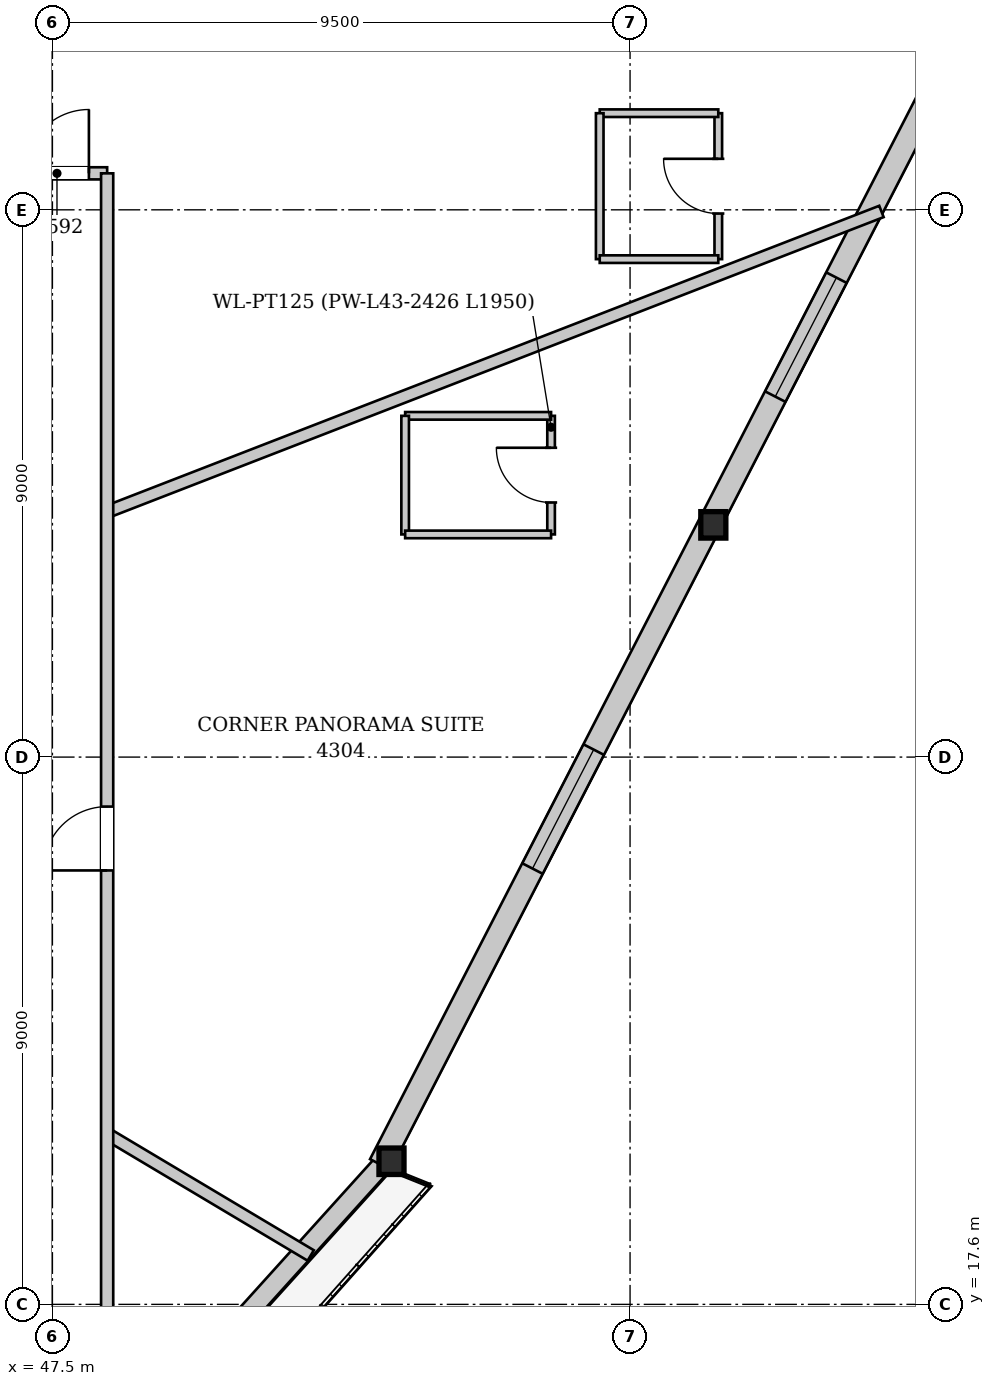
"""IFC4 building model, lengths in metres.
Left out: names, types, materials, properties, quantities, classifications, styles, units other than length and angle.
Written with IfcOpenShell. Run it as: python <this file> out.ifc"""

import sys

from ifc_helpers import new_model, si_unit, direction, frame, frame_2d, origin, origin_2d, place, context, subcontext, project, spatial, rectangle, i_section, extrude, source, transform, mapped, element, fill, save


model = new_model("IFC4")
c1 = context("Model", 3, precision=1e-05, world=origin(), true_north=direction((0.0, 1.0)))
c2 = subcontext(c1, "Body", "Model", "MODEL_VIEW")
j1 = project(units=[si_unit("LENGTHUNIT", "METRE"), si_unit("PLANEANGLEUNIT", "RADIAN")], contexts=[c1])
p1 = place(None, origin())
s1 = spatial("IfcSite", under=j1, at=p1, CompositionType="ELEMENT")
p2 = place(p1, origin())
s2 = spatial("IfcBuilding", under=s1, at=p2, CompositionType="ELEMENT")
p3 = place(p2, frame((0.0, 0.0, 164.35)))
s3 = spatial("IfcBuildingStorey", under=s2, at=p3, CompositionType="ELEMENT", Elevation=164.35)
m1 = source(origin(), c2, "Body", "SweptSolid", [
    extrude(i_section(OverallWidth=0.412, OverallDepth=0.435, WebThickness=0.031, FlangeThickness=0.05, at=origin_2d()), origin(), (0.0, 0.0, 1.0), 3.396),
])
p4 = place(p3, frame((53.062, 19.814, 0.0), z_axis=(0.008697331345, 0.081941799451, 0.99659916613), x_axis=(-0.994414264622, 0.105547478964, 0.0)))
e1 = element("IfcColumn", 1, at=p4, inside=s3, PredefinedType="COLUMN", context=c2, shape_type="MappedRepresentation", body=[
    mapped(m1, transform((0.0, 0.0, 0.0), x_axis=(1.0, 0.0, 0.0), y_axis=(0.0, 1.0, 0.0), z_axis=(0.0, 0.0, 1.0), scale=1.0)),
])
m2 = source(origin(), c2, "Body", "SweptSolid", [
    extrude(i_section(OverallWidth=0.412, OverallDepth=0.435, WebThickness=0.031, FlangeThickness=0.05, at=origin_2d()), origin(), (0.0, 0.0, 1.0), 3.404),
])
p5 = place(p3, frame((58.43, 30.25, 0.0), z_axis=(-0.035575108615, 0.09897913284, 0.994453389008), x_axis=(-0.941061150678, -0.338236471548, 0.0)))
e2 = element("IfcColumn", 2, at=p5, inside=s3, PredefinedType="COLUMN", context=c2, shape_type="MappedRepresentation", body=[
    mapped(m2, transform((0.0, 0.0, 0.0), x_axis=(1.0, 0.0, 0.0), y_axis=(0.0, 1.0, 0.0), z_axis=(0.0, 0.0, 1.0), scale=1.0)),
])
p6 = place(p3, frame((52.943, 19.922, 0.0), z_axis=(0.0, 0.0, 1.0), x_axis=(-0.670163184214, -0.742213787614, 0.0)))
e3 = element("IfcWall", 3, at=p6, inside=s3, PredefinedType="SOLIDWALL", context=c2, shape_type="SweptSolid", body=[
    extrude(rectangle(XDim=23.472, YDim=0.32, at=frame_2d((11.736, 0.0))), origin(), (0.0, 0.0, 1.0), 2.722),
])
p7 = place(p6, frame((6.761, 0.0, 0.0)))
e4 = element("IfcOpeningElement", 4, at=p7, cuts=e3, PredefinedType="OPENING", context=c2, shape_type="SweptSolid", body=[
    extrude(rectangle(XDim=1.5, YDim=2.3, at=frame_2d((0.75, 1.15))), frame((0.0, 0.17, 0.0), z_axis=(0.0, -1.0, 0.0), x_axis=(1.0, 0.0, 0.0)), (0.0, 0.0, 1.0), 0.34),
])
p8 = place(p6, frame((17.669, 0.0, 0.252)))
e5 = element("IfcOpeningElement", 5, at=p8, cuts=e3, PredefinedType="OPENING", context=c2, shape_type="SweptSolid", body=[
    extrude(rectangle(XDim=2.6, YDim=2.35, at=frame_2d((1.3, 1.175))), frame((0.0, 0.17, 0.0), z_axis=(0.0, -1.0, 0.0), x_axis=(1.0, 0.0, 0.0)), (0.0, 0.0, 1.0), 0.34),
])
p9 = place(p3, frame((63.629, 40.773, 0.0), z_axis=(0.0, 0.0, 1.0), x_axis=(-0.457435909199, -0.889242592871, 0.0)))
e6 = element("IfcWall", 6, at=p9, inside=s3, PredefinedType="SOLIDWALL", context=c2, shape_type="SweptSolid", body=[
    extrude(rectangle(XDim=23.472, YDim=0.38, at=frame_2d((11.736, 0.0))), origin(), (0.0, 0.0, 1.0), 2.722),
])
p10 = place(p9, frame((7.072, 0.0, 0.352)))
e7 = element("IfcOpeningElement", 7, at=p10, cuts=e6, PredefinedType="OPENING", context=c2, shape_type="SweptSolid", body=[
    extrude(rectangle(XDim=2.2, YDim=2.25, at=frame_2d((1.1, 1.125))), frame((0.0, 0.2, 0.0), z_axis=(0.0, -1.0, 0.0), x_axis=(1.0, 0.0, 0.0)), (0.0, 0.0, 1.0), 0.4),
])
p11 = place(p9, frame((15.8, 0.0, 0.352)))
e8 = element("IfcOpeningElement", 8, at=p11, cuts=e6, PredefinedType="OPENING", context=c2, shape_type="SweptSolid", body=[
    extrude(rectangle(XDim=2.2, YDim=2.25, at=frame_2d((1.1, 1.125))), frame((0.0, 0.2, 0.0), z_axis=(0.0, -1.0, 0.0), x_axis=(1.0, 0.0, 0.0)), (0.0, 0.0, 1.0), 0.4),
])
p12 = place(p3, frame((48.4, 20.4, 0.0), z_axis=(0.0, 0.0, 1.0), x_axis=(0.858964986341, -0.512034327209, 0.0)))
e9 = element("IfcWall", 9, at=p12, inside=s3, PredefinedType="PARTITIONING", context=c2, shape_type="SweptSolid", body=[
    extrude(rectangle(XDim=3.898, YDim=0.2, at=frame_2d((1.949, 0.0))), origin(), (0.0, 0.0, 1.0), 3.33),
])
p13 = place(p3, frame((48.4, 30.634, 0.0), z_axis=(0.0, 0.0, 1.0), x_axis=(0.932320972831, 0.361631862008, 0.0)))
e10 = element("IfcWall", 10, at=p13, inside=s3, PredefinedType="PARTITIONING", context=c2, shape_type="SweptSolid", body=[
    extrude(rectangle(XDim=13.659, YDim=0.2, at=frame_2d((6.829, 0.0))), origin(), (0.0, 0.0, 1.0), 3.33),
])
p14 = place(p3, frame((55.701, 30.262, 0.0), z_axis=(0.0, 0.0, 1.0), x_axis=(0.0, 1.0, 0.0)))
e11 = element("IfcWall", 11, at=p14, inside=s3, PredefinedType="PARTITIONING", context=c2, shape_type="SweptSolid", body=[
    extrude(rectangle(XDim=1.95, YDim=0.125, at=frame_2d((0.975, 0.0))), origin(), (0.0, 0.0, 1.0), 3.33),
])
p15 = place(p14, frame((0.525, 0.0, 0.0)))
e12 = element("IfcOpeningElement", 12, at=p15, cuts=e11, PredefinedType="OPENING", context=c2, shape_type="SweptSolid", body=[
    extrude(rectangle(XDim=0.9, YDim=2.1, at=frame_2d((0.45, 1.05))), frame((0.0, 0.073, 0.0), z_axis=(0.0, -1.0, 0.0), x_axis=(1.0, 0.0, 0.0)), (0.0, 0.0, 1.0), 0.145),
])
p16 = place(p3, frame((55.701, 32.212, 0.0), z_axis=(0.0, 0.0, 1.0), x_axis=(-1.0, 0.0, 0.0)))
e13 = element("IfcWall", 13, at=p16, inside=s3, PredefinedType="PARTITIONING", context=c2, shape_type="SweptSolid", body=[
    extrude(rectangle(XDim=2.4, YDim=0.125, at=frame_2d((1.2, 0.0))), origin(), (0.0, 0.0, 1.0), 3.33),
])
p17 = place(p3, frame((53.301, 32.212, 0.0), z_axis=(0.0, 0.0, 1.0), x_axis=(0.0, -1.0, 0.0)))
e14 = element("IfcWall", 14, at=p17, inside=s3, PredefinedType="PARTITIONING", context=c2, shape_type="SweptSolid", body=[
    extrude(rectangle(XDim=1.95, YDim=0.125, at=frame_2d((0.975, 0.0))), origin(), (0.0, 0.0, 1.0), 3.33),
])
p18 = place(p3, frame((53.301, 30.262, 0.0), z_axis=(0.0, 0.0, 1.0), x_axis=(1.0, 0.0, 0.0)))
e15 = element("IfcWall", 15, at=p18, inside=s3, PredefinedType="PARTITIONING", context=c2, shape_type="SweptSolid", body=[
    extrude(rectangle(XDim=2.4, YDim=0.125, at=frame_2d((1.2, 0.0))), origin(), (0.0, 0.0, 1.0), 3.33),
])
p19 = place(p3, frame((58.451, 34.789, 0.0), z_axis=(0.0, 0.0, 1.0), x_axis=(0.0, 1.0, 0.0)))
e16 = element("IfcWall", 16, at=p19, inside=s3, PredefinedType="PARTITIONING", context=c2, shape_type="SweptSolid", body=[
    extrude(rectangle(XDim=2.4, YDim=0.125, at=frame_2d((1.2, 0.0))), origin(), (0.0, 0.0, 1.0), 3.33),
])
p20 = place(p19, frame((0.75, 0.0, 0.0)))
e17 = element("IfcOpeningElement", 17, at=p20, cuts=e16, PredefinedType="OPENING", context=c2, shape_type="SweptSolid", body=[
    extrude(rectangle(XDim=0.9, YDim=2.1, at=frame_2d((0.45, 1.05))), frame((0.0, 0.073, 0.0), z_axis=(0.0, -1.0, 0.0), x_axis=(1.0, 0.0, 0.0)), (0.0, 0.0, 1.0), 0.145),
])
p21 = place(p3, frame((58.451, 37.189, 0.0), z_axis=(0.0, 0.0, 1.0), x_axis=(-1.0, 0.0, 0.0)))
e18 = element("IfcWall", 18, at=p21, inside=s3, PredefinedType="PARTITIONING", context=c2, shape_type="SweptSolid", body=[
    extrude(rectangle(XDim=1.95, YDim=0.125, at=frame_2d((0.975, 0.0))), origin(), (0.0, 0.0, 1.0), 2.925),
])
p22 = place(p3, frame((56.501, 37.189, 0.0), z_axis=(0.0, 0.0, 1.0), x_axis=(0.0, -1.0, 0.0)))
e19 = element("IfcWall", 19, at=p22, inside=s3, PredefinedType="PARTITIONING", context=c2, shape_type="SweptSolid", body=[
    extrude(rectangle(XDim=2.4, YDim=0.125, at=frame_2d((1.2, 0.0))), origin(), (0.0, 0.0, 1.0), 3.33),
])
p23 = place(p3, frame((56.501, 34.789, 0.0), z_axis=(0.0, 0.0, 1.0), x_axis=(1.0, 0.0, 0.0)))
e20 = element("IfcWall", 20, at=p23, inside=s3, PredefinedType="PARTITIONING", context=c2, shape_type="SweptSolid", body=[
    extrude(rectangle(XDim=1.95, YDim=0.125, at=frame_2d((0.975, 0.0))), origin(), (0.0, 0.0, 1.0), 3.33),
])
p24 = place(p3, frame((43.4, 36.2, 0.0), z_axis=(0.0, 0.0, 1.0), x_axis=(1.0, 0.0, 0.0)))
e21 = element("IfcWall", 21, at=p24, inside=s3, PredefinedType="PARTITIONING", context=c2, shape_type="SweptSolid", body=[
    extrude(rectangle(XDim=5.0, YDim=0.2, at=frame_2d((2.5, 0.0))), origin(), (0.0, 0.0, 1.0), 3.33),
])
p25 = place(p24, frame((3.65, 0.0, 0.0)))
e22 = element("IfcOpeningElement", 22, at=p25, cuts=e21, PredefinedType="OPENING", context=c2, shape_type="SweptSolid", body=[
    extrude(rectangle(XDim=1.05, YDim=2.2, at=frame_2d((0.525, 1.1))), frame((0.0, 0.11, 0.0), z_axis=(0.0, -1.0, 0.0), x_axis=(1.0, 0.0, 0.0)), (0.0, 0.0, 1.0), 0.22),
])
p26 = place(p3, frame((48.4, 17.0, 0.0), z_axis=(0.0, 0.0, 1.0), x_axis=(0.0, 1.0, 0.0)))
e23 = element("IfcWall", 23, at=p26, inside=s3, PredefinedType="PARTITIONING", context=c2, shape_type="SweptSolid", body=[
    extrude(rectangle(XDim=19.2, YDim=0.2, at=frame_2d((9.6, 0.0))), origin(), (0.0, 0.0, 1.0), 3.33),
])
p27 = place(p26, frame((7.736, 0.0, 0.0)))
e24 = element("IfcOpeningElement", 24, at=p27, cuts=e23, PredefinedType="OPENING", context=c2, shape_type="SweptSolid", body=[
    extrude(rectangle(XDim=1.05, YDim=2.2, at=frame_2d((0.525, 1.1))), frame((0.0, 0.11, 0.0), z_axis=(0.0, -1.0, 0.0), x_axis=(1.0, 0.0, 0.0)), (0.0, 0.0, 1.0), 0.22),
])
m3 = source(origin(), c2, "Body", "SweptSolid", [
    extrude(rectangle(XDim=2.2, YDim=2.25, at=frame_2d((1.1, 1.125))), frame((0.0, 0.03, 0.0), z_axis=(0.0, -1.0, 0.0), x_axis=(1.0, 0.0, 0.0)), (0.0, 0.0, 1.0), 0.06),
])
p28 = place(p10, origin())
e25 = element("IfcWindow", 25, at=p28, inside=s3, PartitioningType="SINGLE_PANEL", PredefinedType="WINDOW", context=c2, shape_type="MappedRepresentation", body=[
    mapped(m3, transform((0.0, 0.0, 0.0), x_axis=(1.0, 0.0, 0.0), y_axis=(0.0, 1.0, 0.0), z_axis=(0.0, 0.0, 1.0), scale=1.0)),
])
fill(e7, e25)
p29 = place(p11, origin())
e26 = element("IfcWindow", 26, at=p29, inside=s3, PartitioningType="SINGLE_PANEL", PredefinedType="WINDOW", context=c2, shape_type="MappedRepresentation", body=[
    mapped(m3, transform((0.0, 0.0, 0.0), x_axis=(1.0, 0.0, 0.0), y_axis=(0.0, 1.0, 0.0), z_axis=(0.0, 0.0, 1.0), scale=1.0)),
])
fill(e8, e26)
m4 = source(origin(), c2, "Body", "SweptSolid", [
    extrude(rectangle(XDim=0.9, YDim=2.1, at=frame_2d((0.45, 1.05))), frame((0.0, 0.025, 0.0), z_axis=(0.0, -1.0, 0.0), x_axis=(1.0, 0.0, 0.0)), (0.0, 0.0, 1.0), 0.05),
])
p30 = place(p15, origin())
e27 = element("IfcDoor", 27, at=p30, inside=s3, OperationType="SINGLE_SWING_RIGHT", PredefinedType="DOOR", context=c2, shape_type="MappedRepresentation", body=[
    mapped(m4, transform((0.0, 0.0, 0.0), x_axis=(1.0, 0.0, 0.0), y_axis=(0.0, 1.0, 0.0), z_axis=(0.0, 0.0, 1.0), scale=1.0)),
])
fill(e12, e27)
p31 = place(p20, origin())
e28 = element("IfcDoor", 28, at=p31, inside=s3, OperationType="SINGLE_SWING_RIGHT", PredefinedType="DOOR", context=c2, shape_type="MappedRepresentation", body=[
    mapped(m4, transform((0.0, 0.0, 0.0), x_axis=(1.0, 0.0, 0.0), y_axis=(0.0, 1.0, 0.0), z_axis=(0.0, 0.0, 1.0), scale=1.0)),
])
fill(e17, e28)
m5 = source(origin(), c2, "Body", "SweptSolid", [
    extrude(rectangle(XDim=1.05, YDim=2.2, at=frame_2d((0.525, 1.1))), frame((0.0, 0.025, 0.0), z_axis=(0.0, -1.0, 0.0), x_axis=(1.0, 0.0, 0.0)), (0.0, 0.0, 1.0), 0.05),
])
p32 = place(p25, origin())
e29 = element("IfcDoor", 29, at=p32, inside=s3, OperationType="SINGLE_SWING_RIGHT", PredefinedType="DOOR", context=c2, shape_type="MappedRepresentation", body=[
    mapped(m5, transform((0.0, 0.0, 0.0), x_axis=(1.0, 0.0, 0.0), y_axis=(0.0, 1.0, 0.0), z_axis=(0.0, 0.0, 1.0), scale=1.0)),
])
fill(e22, e29)
p33 = place(p27, origin())
e30 = element("IfcDoor", 30, at=p33, inside=s3, OperationType="SINGLE_SWING_LEFT", PredefinedType="DOOR", context=c2, shape_type="MappedRepresentation", body=[
    mapped(m5, transform((0.0, 0.0, 0.0), x_axis=(1.0, 0.0, 0.0), y_axis=(0.0, 1.0, 0.0), z_axis=(0.0, 0.0, 1.0), scale=1.0)),
])
fill(e24, e30)
save(model, sys.argv[1])
